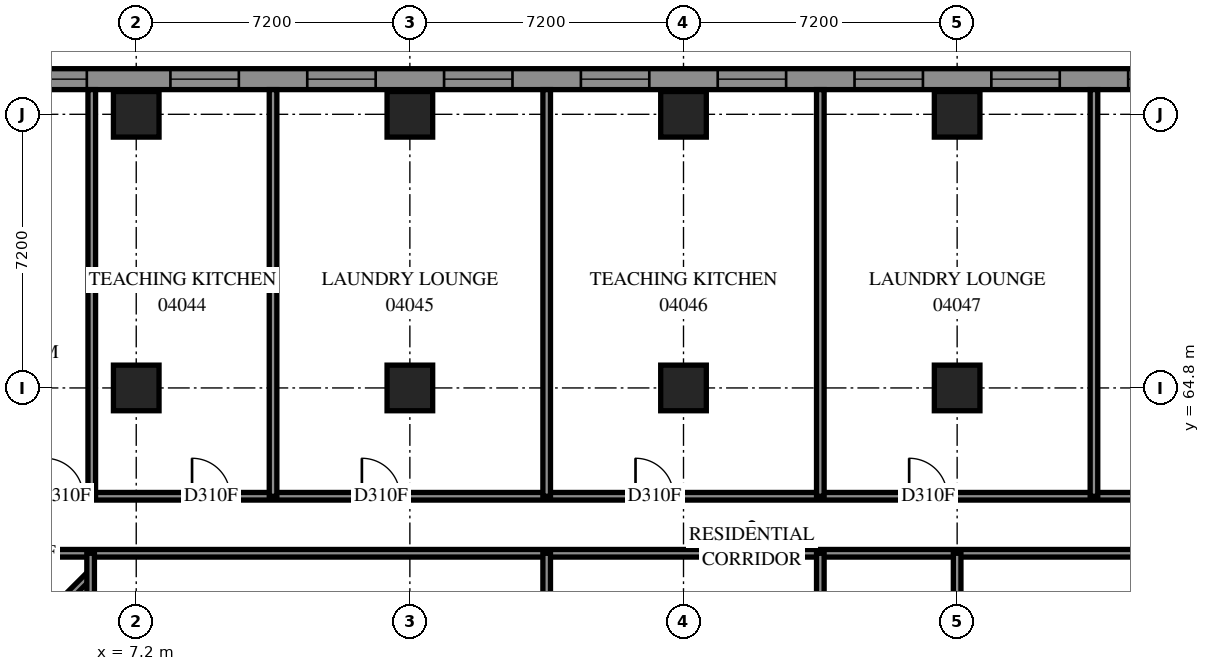
"""IFC4 building model, lengths in metres.
Left out: names, types, materials, properties, quantities, classifications, styles, units other than length and angle.
Written with IfcOpenShell. Run it as: python <this file> out.ifc"""

import sys

from ifc_helpers import new_model, si_unit, direction, frame, frame_2d, origin, origin_2d, place, context, subcontext, project, spatial, polyline, rectangle, outline, extrude, element, fill, save


model = new_model("IFC4")
c1 = context("Model", 3, precision=1e-05, world=origin(), true_north=direction((0.0, 1.0)))
c2 = subcontext(c1, "Body", "Model", "MODEL_VIEW")
j1 = project(units=[si_unit("LENGTHUNIT", "METRE"), si_unit("PLANEANGLEUNIT", "RADIAN")], contexts=[c1])
p1 = place(None, origin())
s1 = spatial("IfcSite", under=j1, at=p1, CompositionType="ELEMENT")
p2 = place(p1, origin())
s2 = spatial("IfcBuilding", under=s1, at=p2, CompositionType="ELEMENT")
p3 = place(p2, frame((0.0, 0.0, 18.6)))
s3 = spatial("IfcBuildingStorey", under=s2, at=p3, CompositionType="ELEMENT", Elevation=18.6)
for number, where, z_axis, x_axis in (
    (1, (7.2, 64.8, 0.0), (0.0, 0.0, 1.0), (1.0, 0.0, 0.0)),
    (2, (7.2, 72.0, 0.0), (0.0, 0.0, 1.0), (1.0, 0.0, 0.0)),
    (3, (14.4, 64.8, 0.0), (0.0, 0.0, 1.0), (1.0, 0.0, 0.0)),
    (4, (14.4, 72.0, 0.0), (0.0, 0.0, 1.0), (1.0, 0.0, 0.0)),
    (5, (21.6, 64.8, 0.0), (0.0, 0.0, 1.0), (1.0, 0.0, 0.0)),
    (6, (21.6, 72.0, 0.0), (0.0, 0.0, 1.0), (1.0, 0.0, 0.0)),
    (7, (28.8, 64.8, 0.0), (0.0, 0.0, 1.0), (1.0, 0.0, 0.0)),
    (8, (28.8, 72.0, 0.0), (0.0, 0.0, 1.0), (1.0, 0.0, 0.0)),
):
    element("IfcColumn", number, at=place(p3, frame(where, z_axis=z_axis, x_axis=x_axis)), inside=s3, PredefinedType="COLUMN", context=c2, shape_type="SweptSolid", body=[
        extrude(rectangle(XDim=1.2, YDim=1.2, at=origin_2d()), origin(), (0.0, 0.0, 1.0), 3.8),
    ])
p4 = place(p3, frame((79.583, 72.925, 0.0), z_axis=(0.0, 0.0, 1.0), x_axis=(-1.0, 0.0, 0.0)))
e9 = element("IfcWall", 9, at=p4, inside=s3, PredefinedType="SOLIDWALL", context=c2, shape_type="SweptSolid", body=[
    extrude(outline(polyline([(-0.114, -0.275), (79.583, -0.275), (79.033, 0.275), (0.114, 0.275), (-0.114, -0.275)])), origin(), (0.0, 0.0, 1.0), 3.8),
])
p5 = place(p4, frame((1.249, 0.0, 0.7)))
e10 = element("IfcOpeningElement", 10, at=p5, cuts=e9, PredefinedType="OPENING", context=c2, shape_type="SweptSolid", body=[
    extrude(rectangle(XDim=1.8, YDim=2.4, at=frame_2d((0.9, 1.2))), frame((0.0, 0.285, 0.0), z_axis=(0.0, -1.0, 0.0), x_axis=(1.0, 0.0, 0.0)), (0.0, 0.0, 1.0), 0.57),
])
p6 = place(p4, frame((4.883, 0.0, 0.7)))
e11 = element("IfcOpeningElement", 11, at=p6, cuts=e9, PredefinedType="OPENING", context=c2, shape_type="SweptSolid", body=[
    extrude(rectangle(XDim=1.8, YDim=2.4, at=frame_2d((0.9, 1.2))), frame((0.0, 0.285, 0.0), z_axis=(0.0, -1.0, 0.0), x_axis=(1.0, 0.0, 0.0)), (0.0, 0.0, 1.0), 0.57),
])
p7 = place(p4, frame((8.483, 0.0, 0.7)))
e12 = element("IfcOpeningElement", 12, at=p7, cuts=e9, PredefinedType="OPENING", context=c2, shape_type="SweptSolid", body=[
    extrude(rectangle(XDim=1.8, YDim=2.4, at=frame_2d((0.9, 1.2))), frame((0.0, 0.285, 0.0), z_axis=(0.0, -1.0, 0.0), x_axis=(1.0, 0.0, 0.0)), (0.0, 0.0, 1.0), 0.57),
])
p8 = place(p4, frame((12.083, 0.0, 0.7)))
e13 = element("IfcOpeningElement", 13, at=p8, cuts=e9, PredefinedType="OPENING", context=c2, shape_type="SweptSolid", body=[
    extrude(rectangle(XDim=1.8, YDim=2.4, at=frame_2d((0.9, 1.2))), frame((0.0, 0.285, 0.0), z_axis=(0.0, -1.0, 0.0), x_axis=(1.0, 0.0, 0.0)), (0.0, 0.0, 1.0), 0.57),
])
p9 = place(p4, frame((15.683, 0.0, 0.7)))
e14 = element("IfcOpeningElement", 14, at=p9, cuts=e9, PredefinedType="OPENING", context=c2, shape_type="SweptSolid", body=[
    extrude(rectangle(XDim=1.8, YDim=2.4, at=frame_2d((0.9, 1.2))), frame((0.0, 0.285, 0.0), z_axis=(0.0, -1.0, 0.0), x_axis=(1.0, 0.0, 0.0)), (0.0, 0.0, 1.0), 0.57),
])
p10 = place(p4, frame((19.283, 0.0, 0.7)))
e15 = element("IfcOpeningElement", 15, at=p10, cuts=e9, PredefinedType="OPENING", context=c2, shape_type="SweptSolid", body=[
    extrude(rectangle(XDim=1.8, YDim=2.4, at=frame_2d((0.9, 1.2))), frame((0.0, 0.285, 0.0), z_axis=(0.0, -1.0, 0.0), x_axis=(1.0, 0.0, 0.0)), (0.0, 0.0, 1.0), 0.57),
])
p11 = place(p4, frame((22.883, 0.0, 0.7)))
e16 = element("IfcOpeningElement", 16, at=p11, cuts=e9, PredefinedType="OPENING", context=c2, shape_type="SweptSolid", body=[
    extrude(rectangle(XDim=1.8, YDim=2.4, at=frame_2d((0.9, 1.2))), frame((0.0, 0.285, 0.0), z_axis=(0.0, -1.0, 0.0), x_axis=(1.0, 0.0, 0.0)), (0.0, 0.0, 1.0), 0.57),
])
p12 = place(p4, frame((26.483, 0.0, 0.7)))
e17 = element("IfcOpeningElement", 17, at=p12, cuts=e9, PredefinedType="OPENING", context=c2, shape_type="SweptSolid", body=[
    extrude(rectangle(XDim=1.8, YDim=2.4, at=frame_2d((0.9, 1.2))), frame((0.0, 0.285, 0.0), z_axis=(0.0, -1.0, 0.0), x_axis=(1.0, 0.0, 0.0)), (0.0, 0.0, 1.0), 0.57),
])
p13 = place(p4, frame((30.083, 0.0, 0.7)))
e18 = element("IfcOpeningElement", 18, at=p13, cuts=e9, PredefinedType="OPENING", context=c2, shape_type="SweptSolid", body=[
    extrude(rectangle(XDim=1.8, YDim=2.4, at=frame_2d((0.9, 1.2))), frame((0.0, 0.285, 0.0), z_axis=(0.0, -1.0, 0.0), x_axis=(1.0, 0.0, 0.0)), (0.0, 0.0, 1.0), 0.57),
])
p14 = place(p4, frame((33.683, 0.0, 0.7)))
e19 = element("IfcOpeningElement", 19, at=p14, cuts=e9, PredefinedType="OPENING", context=c2, shape_type="SweptSolid", body=[
    extrude(rectangle(XDim=1.8, YDim=2.4, at=frame_2d((0.9, 1.2))), frame((0.0, 0.285, 0.0), z_axis=(0.0, -1.0, 0.0), x_axis=(1.0, 0.0, 0.0)), (0.0, 0.0, 1.0), 0.57),
])
p15 = place(p4, frame((37.283, 0.0, 0.7)))
e20 = element("IfcOpeningElement", 20, at=p15, cuts=e9, PredefinedType="OPENING", context=c2, shape_type="SweptSolid", body=[
    extrude(rectangle(XDim=1.8, YDim=2.4, at=frame_2d((0.9, 1.2))), frame((0.0, 0.285, 0.0), z_axis=(0.0, -1.0, 0.0), x_axis=(1.0, 0.0, 0.0)), (0.0, 0.0, 1.0), 0.57),
])
p16 = place(p4, frame((40.883, 0.0, 0.7)))
e21 = element("IfcOpeningElement", 21, at=p16, cuts=e9, PredefinedType="OPENING", context=c2, shape_type="SweptSolid", body=[
    extrude(rectangle(XDim=1.8, YDim=2.4, at=frame_2d((0.9, 1.2))), frame((0.0, 0.285, 0.0), z_axis=(0.0, -1.0, 0.0), x_axis=(1.0, 0.0, 0.0)), (0.0, 0.0, 1.0), 0.57),
])
p17 = place(p4, frame((44.483, 0.0, 0.7)))
e22 = element("IfcOpeningElement", 22, at=p17, cuts=e9, PredefinedType="OPENING", context=c2, shape_type="SweptSolid", body=[
    extrude(rectangle(XDim=1.8, YDim=2.4, at=frame_2d((0.9, 1.2))), frame((0.0, 0.285, 0.0), z_axis=(0.0, -1.0, 0.0), x_axis=(1.0, 0.0, 0.0)), (0.0, 0.0, 1.0), 0.57),
])
p18 = place(p4, frame((48.083, 0.0, 0.7)))
e23 = element("IfcOpeningElement", 23, at=p18, cuts=e9, PredefinedType="OPENING", context=c2, shape_type="SweptSolid", body=[
    extrude(rectangle(XDim=1.8, YDim=2.4, at=frame_2d((0.9, 1.2))), frame((0.0, 0.285, 0.0), z_axis=(0.0, -1.0, 0.0), x_axis=(1.0, 0.0, 0.0)), (0.0, 0.0, 1.0), 0.57),
])
p19 = place(p4, frame((51.683, 0.0, 0.7)))
e24 = element("IfcOpeningElement", 24, at=p19, cuts=e9, PredefinedType="OPENING", context=c2, shape_type="SweptSolid", body=[
    extrude(rectangle(XDim=1.8, YDim=2.4, at=frame_2d((0.9, 1.2))), frame((0.0, 0.285, 0.0), z_axis=(0.0, -1.0, 0.0), x_axis=(1.0, 0.0, 0.0)), (0.0, 0.0, 1.0), 0.57),
])
p20 = place(p4, frame((55.283, 0.0, 0.7)))
e25 = element("IfcOpeningElement", 25, at=p20, cuts=e9, PredefinedType="OPENING", context=c2, shape_type="SweptSolid", body=[
    extrude(rectangle(XDim=1.8, YDim=2.4, at=frame_2d((0.9, 1.2))), frame((0.0, 0.285, 0.0), z_axis=(0.0, -1.0, 0.0), x_axis=(1.0, 0.0, 0.0)), (0.0, 0.0, 1.0), 0.57),
])
p21 = place(p4, frame((58.883, 0.0, 0.7)))
e26 = element("IfcOpeningElement", 26, at=p21, cuts=e9, PredefinedType="OPENING", context=c2, shape_type="SweptSolid", body=[
    extrude(rectangle(XDim=1.8, YDim=2.4, at=frame_2d((0.9, 1.2))), frame((0.0, 0.285, 0.0), z_axis=(0.0, -1.0, 0.0), x_axis=(1.0, 0.0, 0.0)), (0.0, 0.0, 1.0), 0.57),
])
p22 = place(p4, frame((62.483, 0.0, 0.7)))
e27 = element("IfcOpeningElement", 27, at=p22, cuts=e9, PredefinedType="OPENING", context=c2, shape_type="SweptSolid", body=[
    extrude(rectangle(XDim=1.8, YDim=2.4, at=frame_2d((0.9, 1.2))), frame((0.0, 0.285, 0.0), z_axis=(0.0, -1.0, 0.0), x_axis=(1.0, 0.0, 0.0)), (0.0, 0.0, 1.0), 0.57),
])
p23 = place(p4, frame((66.083, 0.0, 0.7)))
e28 = element("IfcOpeningElement", 28, at=p23, cuts=e9, PredefinedType="OPENING", context=c2, shape_type="SweptSolid", body=[
    extrude(rectangle(XDim=1.8, YDim=2.4, at=frame_2d((0.9, 1.2))), frame((0.0, 0.285, 0.0), z_axis=(0.0, -1.0, 0.0), x_axis=(1.0, 0.0, 0.0)), (0.0, 0.0, 1.0), 0.57),
])
p24 = place(p4, frame((69.683, 0.0, 0.7)))
e29 = element("IfcOpeningElement", 29, at=p24, cuts=e9, PredefinedType="OPENING", context=c2, shape_type="SweptSolid", body=[
    extrude(rectangle(XDim=1.8, YDim=2.4, at=frame_2d((0.9, 1.2))), frame((0.0, 0.285, 0.0), z_axis=(0.0, -1.0, 0.0), x_axis=(1.0, 0.0, 0.0)), (0.0, 0.0, 1.0), 0.57),
])
p25 = place(p4, frame((73.683, 0.0, 0.7)))
e30 = element("IfcOpeningElement", 30, at=p25, cuts=e9, PredefinedType="OPENING", context=c2, shape_type="SweptSolid", body=[
    extrude(rectangle(XDim=1.8, YDim=2.4, at=frame_2d((0.9, 1.2))), frame((0.0, 0.285, 0.0), z_axis=(0.0, -1.0, 0.0), x_axis=(1.0, 0.0, 0.0)), (0.0, 0.0, 1.0), 0.57),
])
p26 = place(p4, frame((76.508, 0.0, 0.7)))
e31 = element("IfcOpeningElement", 31, at=p26, cuts=e9, PredefinedType="OPENING", context=c2, shape_type="SweptSolid", body=[
    extrude(rectangle(XDim=1.8, YDim=2.4, at=frame_2d((0.9, 1.2))), frame((0.0, 0.285, 0.0), z_axis=(0.0, -1.0, 0.0), x_axis=(1.0, 0.0, 0.0)), (0.0, 0.0, 1.0), 0.57),
])
p27 = place(p3, frame((0.002, 60.45, 0.0), z_axis=(0.0, 0.0, 1.0), x_axis=(1.0, 0.0, 0.0)))
e32 = element("IfcWall", 32, at=p27, inside=s3, PredefinedType="PARTITIONING", context=c2, shape_type="SweptSolid", body=[
    extrude(rectangle(XDim=55.098, YDim=0.2, at=frame_2d((27.549, 0.0))), origin(), (0.0, 0.0, 1.0), 3.8),
])
p28 = place(p27, frame((49.69, 0.0, 0.0)))
e33 = element("IfcOpeningElement", 33, at=p28, cuts=e32, PredefinedType="OPENING", context=c2, shape_type="SweptSolid", body=[
    extrude(rectangle(XDim=1.0, YDim=2.1, at=frame_2d((0.5, 1.05))), frame((0.0, 0.11, 0.0), z_axis=(0.0, -1.0, 0.0), x_axis=(1.0, 0.0, 0.0)), (0.0, 0.0, 1.0), 0.22),
])
p29 = place(p27, frame((3.897, 0.0, 0.0)))
e34 = element("IfcOpeningElement", 34, at=p29, cuts=e32, PredefinedType="OPENING", context=c2, shape_type="SweptSolid", body=[
    extrude(rectangle(XDim=1.0, YDim=2.1, at=frame_2d((0.5, 1.05))), frame((0.0, 0.11, 0.0), z_axis=(0.0, -1.0, 0.0), x_axis=(1.0, 0.0, 0.0)), (0.0, 0.0, 1.0), 0.22),
])
p30 = place(p3, frame((0.002, 61.95, 0.0), z_axis=(0.0, 0.0, 1.0), x_axis=(1.0, 0.0, 0.0)))
e35 = element("IfcWall", 35, at=p30, inside=s3, PredefinedType="PARTITIONING", context=c2, shape_type="SweptSolid", body=[
    extrude(rectangle(XDim=55.098, YDim=0.2, at=frame_2d((27.549, 0.0))), origin(), (0.0, 0.0, 1.0), 3.8),
])
p31 = place(p30, frame((8.667, 0.0, 0.0)))
e36 = element("IfcOpeningElement", 36, at=p31, cuts=e35, PredefinedType="OPENING", context=c2, shape_type="SweptSolid", body=[
    extrude(rectangle(XDim=1.0, YDim=2.1, at=frame_2d((0.5, 1.05))), frame((0.0, 0.11, 0.0), z_axis=(0.0, -1.0, 0.0), x_axis=(1.0, 0.0, 0.0)), (0.0, 0.0, 1.0), 0.22),
])
p32 = place(p30, frame((13.136, 0.0, 0.0)))
e37 = element("IfcOpeningElement", 37, at=p32, cuts=e35, PredefinedType="OPENING", context=c2, shape_type="SweptSolid", body=[
    extrude(rectangle(XDim=1.0, YDim=2.1, at=frame_2d((0.5, 1.05))), frame((0.0, 0.11, 0.0), z_axis=(0.0, -1.0, 0.0), x_axis=(1.0, 0.0, 0.0)), (0.0, 0.0, 1.0), 0.22),
])
p33 = place(p30, frame((20.335, 0.0, 0.0)))
e38 = element("IfcOpeningElement", 38, at=p33, cuts=e35, PredefinedType="OPENING", context=c2, shape_type="SweptSolid", body=[
    extrude(rectangle(XDim=1.0, YDim=2.1, at=frame_2d((0.5, 1.05))), frame((0.0, 0.11, 0.0), z_axis=(0.0, -1.0, 0.0), x_axis=(1.0, 0.0, 0.0)), (0.0, 0.0, 1.0), 0.22),
])
p34 = place(p30, frame((27.535, 0.0, 0.0)))
e39 = element("IfcOpeningElement", 39, at=p34, cuts=e35, PredefinedType="OPENING", context=c2, shape_type="SweptSolid", body=[
    extrude(rectangle(XDim=1.0, YDim=2.1, at=frame_2d((0.5, 1.05))), frame((0.0, 0.11, 0.0), z_axis=(0.0, -1.0, 0.0), x_axis=(1.0, 0.0, 0.0)), (0.0, 0.0, 1.0), 0.22),
])
p35 = place(p30, frame((34.736, 0.0, 0.0)))
e40 = element("IfcOpeningElement", 40, at=p35, cuts=e35, PredefinedType="OPENING", context=c2, shape_type="SweptSolid", body=[
    extrude(rectangle(XDim=1.0, YDim=2.1, at=frame_2d((0.5, 1.05))), frame((0.0, 0.11, 0.0), z_axis=(0.0, -1.0, 0.0), x_axis=(1.0, 0.0, 0.0)), (0.0, 0.0, 1.0), 0.22),
])
p36 = place(p30, frame((41.935, 0.0, 0.0)))
e41 = element("IfcOpeningElement", 41, at=p36, cuts=e35, PredefinedType="OPENING", context=c2, shape_type="SweptSolid", body=[
    extrude(rectangle(XDim=1.0, YDim=2.1, at=frame_2d((0.5, 1.05))), frame((0.0, 0.11, 0.0), z_axis=(0.0, -1.0, 0.0), x_axis=(1.0, 0.0, 0.0)), (0.0, 0.0, 1.0), 0.22),
])
p37 = place(p30, frame((49.136, 0.0, 0.0)))
e42 = element("IfcOpeningElement", 42, at=p37, cuts=e35, PredefinedType="OPENING", context=c2, shape_type="SweptSolid", body=[
    extrude(rectangle(XDim=1.0, YDim=2.1, at=frame_2d((0.5, 1.05))), frame((0.0, 0.11, 0.0), z_axis=(0.0, -1.0, 0.0), x_axis=(1.0, 0.0, 0.0)), (0.0, 0.0, 1.0), 0.22),
])
p38 = place(p30, frame((4.799, 0.0, 0.0)))
e43 = element("IfcOpeningElement", 43, at=p38, cuts=e35, PredefinedType="OPENING", context=c2, shape_type="SweptSolid", body=[
    extrude(rectangle(XDim=1.0, YDim=2.1, at=frame_2d((0.5, 1.05))), frame((0.0, 0.11, 0.0), z_axis=(0.0, -1.0, 0.0), x_axis=(1.0, 0.0, 0.0)), (0.0, 0.0, 1.0), 0.22),
])
for number, where, z_axis, x_axis in (
    (44, (6.03, 61.95, 0.0), (0.0, 0.0, 1.0), (0.0, 1.0, 0.0)),
    (45, (10.8, 61.95, 0.0), (0.0, 0.0, 1.0), (0.0, 1.0, 0.0)),
    (46, (18.0, 61.95, 0.0), (0.0, 0.0, 1.0), (0.0, 1.0, 0.0)),
    (47, (25.2, 61.95, 0.0), (0.0, 0.0, 1.0), (0.0, 1.0, 0.0)),
    (48, (32.4, 61.95, 0.0), (0.0, 0.0, 1.0), (0.0, 1.0, 0.0)),
):
    element("IfcWall", number, at=place(p3, frame(where, z_axis=z_axis, x_axis=x_axis)), inside=s3, PredefinedType="PARTITIONING", context=c2, shape_type="SweptSolid", body=[
        extrude(rectangle(XDim=10.7, YDim=0.2, at=frame_2d((5.35, 0.0))), origin(), (0.0, 0.0, 1.0), 3.8),
    ])
p39 = place(p3, frame((0.855, 54.751, 0.0), z_axis=(0.0, 0.0, 1.0), x_axis=(0.7071067812, 0.7071067812, 0.0)))
e49 = element("IfcWall", 49, at=p39, inside=s3, PredefinedType="PARTITIONING", context=c2, shape_type="SweptSolid", body=[
    extrude(rectangle(XDim=7.275, YDim=0.2, at=frame_2d((3.637, 0.0))), origin(), (0.0, 0.0, 1.0), 3.8),
])
for number, where, z_axis, x_axis in (
    (50, (18.0, 54.75, 0.0), (0.0, 0.0, 1.0), (0.0, 1.0, 0.0)),
    (51, (25.2, 54.75, 0.0), (0.0, 0.0, 1.0), (0.0, 1.0, 0.0)),
):
    element("IfcWall", number, at=place(p3, frame(where, z_axis=z_axis, x_axis=x_axis)), inside=s3, PredefinedType="PARTITIONING", context=c2, shape_type="SweptSolid", body=[
        extrude(rectangle(XDim=5.7, YDim=0.2, at=frame_2d((2.85, 0.0))), origin(), (0.0, 0.0, 1.0), 3.8),
    ])
p40 = place(p3, frame((6.0, 54.802, 0.0), z_axis=(0.0, 0.0, 1.0), x_axis=(0.0, 1.0, 0.0)))
e52 = element("IfcWall", 52, at=p40, inside=s3, PredefinedType="PARTITIONING", context=c2, shape_type="SweptSolid", body=[
    extrude(rectangle(XDim=5.648, YDim=0.2, at=frame_2d((2.824, 0.0))), origin(), (0.0, 0.0, 1.0), 3.8),
])
p41 = place(p3, frame((28.8, 58.306, 0.0), z_axis=(0.0, 0.0, 1.0), x_axis=(0.0, 1.0, 0.0)))
e53 = element("IfcWall", 53, at=p41, inside=s3, PredefinedType="PARTITIONING", context=c2, shape_type="SweptSolid", body=[
    extrude(rectangle(XDim=2.144, YDim=0.2, at=frame_2d((1.072, 0.0))), origin(), (0.0, 0.0, 1.0), 3.8),
])
p42 = place(p17, origin())
e54 = element("IfcWindow", 54, at=p42, inside=s3, PartitioningType="SINGLE_PANEL", PredefinedType="WINDOW", context=c2, shape_type="SweptSolid", body=[
    extrude(rectangle(XDim=1.8, YDim=2.4, at=frame_2d((0.9, 1.2))), frame((0.0, 0.155, 0.0), z_axis=(0.0, -1.0, 0.0), x_axis=(1.0, 0.0, 0.0)), (0.0, 0.0, 1.0), 0.06),
])
fill(e22, e54)
p43 = place(p18, origin())
e55 = element("IfcWindow", 55, at=p43, inside=s3, PartitioningType="SINGLE_PANEL", PredefinedType="WINDOW", context=c2, shape_type="SweptSolid", body=[
    extrude(rectangle(XDim=1.8, YDim=2.4, at=frame_2d((0.9, 1.2))), frame((0.0, 0.155, 0.0), z_axis=(0.0, -1.0, 0.0), x_axis=(1.0, 0.0, 0.0)), (0.0, 0.0, 1.0), 0.06),
])
fill(e23, e55)
p44 = place(p19, origin())
e56 = element("IfcWindow", 56, at=p44, inside=s3, PartitioningType="SINGLE_PANEL", PredefinedType="WINDOW", context=c2, shape_type="SweptSolid", body=[
    extrude(rectangle(XDim=1.8, YDim=2.4, at=frame_2d((0.9, 1.2))), frame((0.0, 0.155, 0.0), z_axis=(0.0, -1.0, 0.0), x_axis=(1.0, 0.0, 0.0)), (0.0, 0.0, 1.0), 0.06),
])
fill(e24, e56)
p45 = place(p20, origin())
e57 = element("IfcWindow", 57, at=p45, inside=s3, PartitioningType="SINGLE_PANEL", PredefinedType="WINDOW", context=c2, shape_type="SweptSolid", body=[
    extrude(rectangle(XDim=1.8, YDim=2.4, at=frame_2d((0.9, 1.2))), frame((0.0, 0.155, 0.0), z_axis=(0.0, -1.0, 0.0), x_axis=(1.0, 0.0, 0.0)), (0.0, 0.0, 1.0), 0.06),
])
fill(e25, e57)
p46 = place(p21, origin())
e58 = element("IfcWindow", 58, at=p46, inside=s3, PartitioningType="SINGLE_PANEL", PredefinedType="WINDOW", context=c2, shape_type="SweptSolid", body=[
    extrude(rectangle(XDim=1.8, YDim=2.4, at=frame_2d((0.9, 1.2))), frame((0.0, 0.155, 0.0), z_axis=(0.0, -1.0, 0.0), x_axis=(1.0, 0.0, 0.0)), (0.0, 0.0, 1.0), 0.06),
])
fill(e26, e58)
p47 = place(p22, origin())
e59 = element("IfcWindow", 59, at=p47, inside=s3, PartitioningType="SINGLE_PANEL", PredefinedType="WINDOW", context=c2, shape_type="SweptSolid", body=[
    extrude(rectangle(XDim=1.8, YDim=2.4, at=frame_2d((0.9, 1.2))), frame((0.0, 0.155, 0.0), z_axis=(0.0, -1.0, 0.0), x_axis=(1.0, 0.0, 0.0)), (0.0, 0.0, 1.0), 0.06),
])
fill(e27, e59)
p48 = place(p23, origin())
e60 = element("IfcWindow", 60, at=p48, inside=s3, PartitioningType="SINGLE_PANEL", PredefinedType="WINDOW", context=c2, shape_type="SweptSolid", body=[
    extrude(rectangle(XDim=1.8, YDim=2.4, at=frame_2d((0.9, 1.2))), frame((0.0, 0.155, 0.0), z_axis=(0.0, -1.0, 0.0), x_axis=(1.0, 0.0, 0.0)), (0.0, 0.0, 1.0), 0.06),
])
fill(e28, e60)
p49 = place(p24, origin())
e61 = element("IfcWindow", 61, at=p49, inside=s3, PartitioningType="SINGLE_PANEL", PredefinedType="WINDOW", context=c2, shape_type="SweptSolid", body=[
    extrude(rectangle(XDim=1.8, YDim=2.4, at=frame_2d((0.9, 1.2))), frame((0.0, 0.155, 0.0), z_axis=(0.0, -1.0, 0.0), x_axis=(1.0, 0.0, 0.0)), (0.0, 0.0, 1.0), 0.06),
])
fill(e29, e61)
p50 = place(p25, origin())
e62 = element("IfcWindow", 62, at=p50, inside=s3, PartitioningType="SINGLE_PANEL", PredefinedType="WINDOW", context=c2, shape_type="SweptSolid", body=[
    extrude(rectangle(XDim=1.8, YDim=2.4, at=frame_2d((0.9, 1.2))), frame((0.0, 0.155, 0.0), z_axis=(0.0, -1.0, 0.0), x_axis=(1.0, 0.0, 0.0)), (0.0, 0.0, 1.0), 0.06),
])
fill(e30, e62)
p51 = place(p31, origin())
e63 = element("IfcDoor", 63, at=p51, inside=s3, OperationType="SINGLE_SWING_RIGHT", PredefinedType="DOOR", context=c2, shape_type="SweptSolid", body=[
    extrude(rectangle(XDim=1.0, YDim=2.1, at=frame_2d((0.5, 1.05))), frame((0.0, 0.025, 0.0), z_axis=(0.0, -1.0, 0.0), x_axis=(1.0, 0.0, 0.0)), (0.0, 0.0, 1.0), 0.05),
])
fill(e36, e63)
p52 = place(p32, origin())
e64 = element("IfcDoor", 64, at=p52, inside=s3, OperationType="SINGLE_SWING_LEFT", PredefinedType="DOOR", context=c2, shape_type="SweptSolid", body=[
    extrude(rectangle(XDim=1.0, YDim=2.1, at=frame_2d((0.5, 1.05))), frame((0.0, 0.025, 0.0), z_axis=(0.0, -1.0, 0.0), x_axis=(1.0, 0.0, 0.0)), (0.0, 0.0, 1.0), 0.05),
])
fill(e37, e64)
p53 = place(p33, origin())
e65 = element("IfcDoor", 65, at=p53, inside=s3, OperationType="SINGLE_SWING_LEFT", PredefinedType="DOOR", context=c2, shape_type="SweptSolid", body=[
    extrude(rectangle(XDim=1.0, YDim=2.1, at=frame_2d((0.5, 1.05))), frame((0.0, 0.025, 0.0), z_axis=(0.0, -1.0, 0.0), x_axis=(1.0, 0.0, 0.0)), (0.0, 0.0, 1.0), 0.05),
])
fill(e38, e65)
p54 = place(p34, origin())
e66 = element("IfcDoor", 66, at=p54, inside=s3, OperationType="SINGLE_SWING_LEFT", PredefinedType="DOOR", context=c2, shape_type="SweptSolid", body=[
    extrude(rectangle(XDim=1.0, YDim=2.1, at=frame_2d((0.5, 1.05))), frame((0.0, 0.025, 0.0), z_axis=(0.0, -1.0, 0.0), x_axis=(1.0, 0.0, 0.0)), (0.0, 0.0, 1.0), 0.05),
])
fill(e39, e66)
p55 = place(p38, origin())
e67 = element("IfcDoor", 67, at=p55, inside=s3, OperationType="SINGLE_SWING_LEFT", PredefinedType="DOOR", context=c2, shape_type="SweptSolid", body=[
    extrude(rectangle(XDim=1.0, YDim=2.1, at=frame_2d((0.5, 1.05))), frame((0.0, 0.025, 0.0), z_axis=(0.0, -1.0, 0.0), x_axis=(1.0, 0.0, 0.0)), (0.0, 0.0, 1.0), 0.05),
])
fill(e43, e67)
save(model, sys.argv[1])
